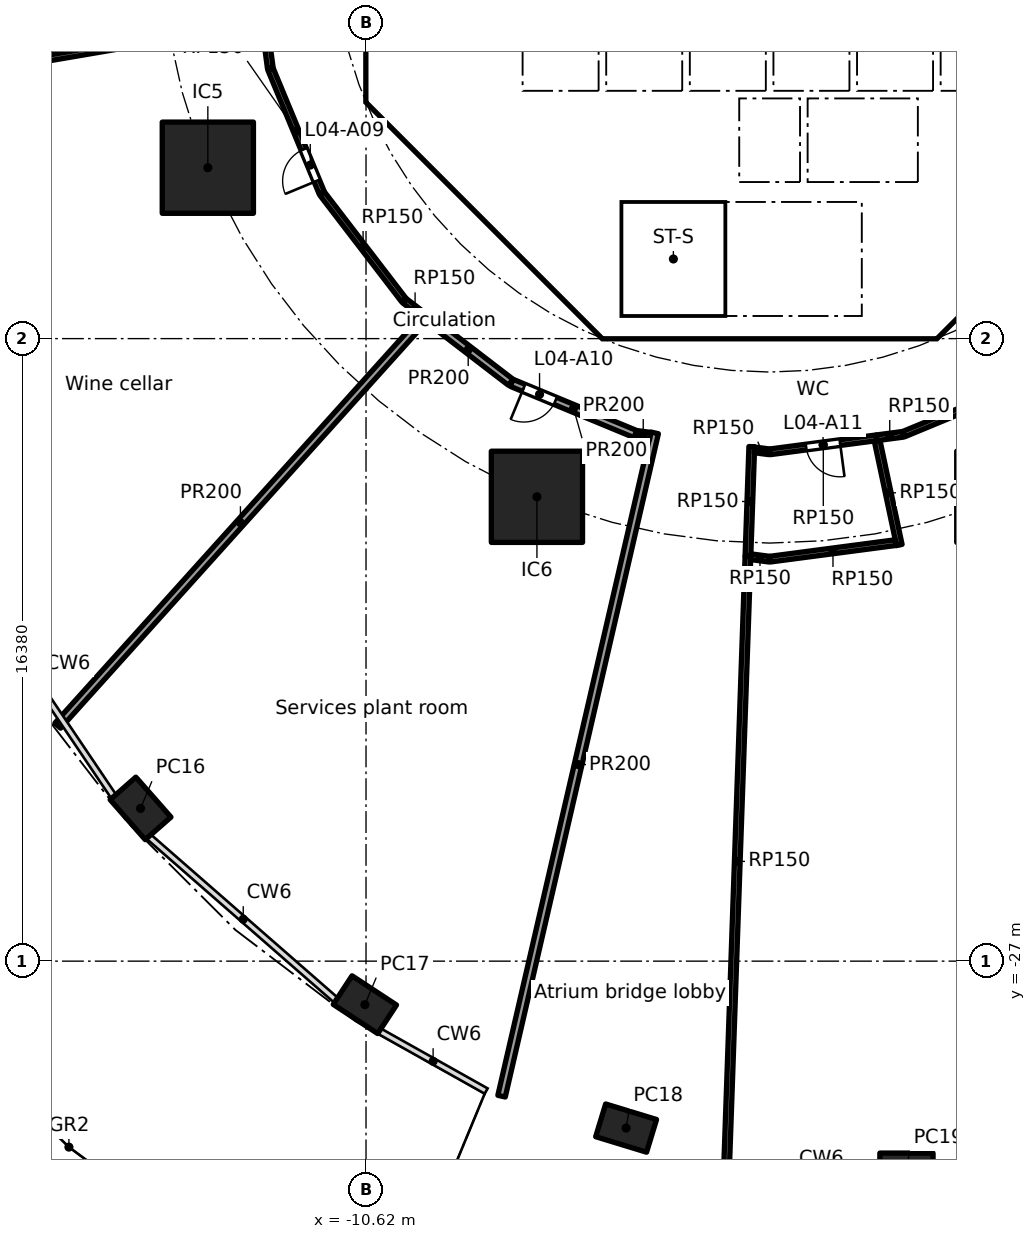
"""IFC4 building model, lengths in metres.
Left out: names, types, materials, properties, quantities, classifications, styles, units other than length and angle.
Written with IfcOpenShell. Run it as: python <this file> out.ifc"""

import sys

from ifc_helpers import new_model, si_unit, direction, frame, frame_2d, origin, origin_2d, place, context, subcontext, project, spatial, polyline, rectangle, hollow_rectangle, outline, extrude, element, fill, save


model = new_model("IFC4")
c1 = context("Model", 3, precision=1e-05, world=origin(), true_north=direction((0.0, 1.0)))
c2 = subcontext(c1, "Body", "Model", "MODEL_VIEW")
j1 = project(units=[si_unit("LENGTHUNIT", "METRE"), si_unit("PLANEANGLEUNIT", "RADIAN")], contexts=[c1])
p1 = place(None, origin())
s1 = spatial("IfcSite", under=j1, at=p1, CompositionType="ELEMENT")
p2 = place(p1, origin())
s2 = spatial("IfcBuilding", under=s1, at=p2, CompositionType="ELEMENT")
p3 = place(p2, frame((0.0, 0.0, 22.0)))
s3 = spatial("IfcBuildingStorey", under=s2, at=p3, CompositionType="ELEMENT", Elevation=22.0)
for number, where, z_axis, x_axis in (
    (1, (-16.552, -22.981, 0.0), (0.0, 0.0, 1.0), (0.66, -0.751, 0.0)),
    (2, (-10.65, -28.146, 0.0), (0.0, 0.0, 1.0), (0.836, -0.549, 0.0)),
    (3, (-3.776, -31.393, 0.0), (0.0, 0.0, 1.0), (0.957, -0.292, 0.0)),
    (4, (3.6, -32.5, 0.0), (0.0, 0.0, 1.0), (1.0, 0.0, 0.0)),
):
    element("IfcColumn", number, at=place(p3, frame(where, z_axis=z_axis, x_axis=x_axis)), inside=s3, PredefinedType="COLUMN", context=c2, shape_type="SweptSolid", body=[
        extrude(hollow_rectangle(XDim=1.4, YDim=0.9, WallThickness=0.05, at=origin_2d()), origin(), (0.0, 0.0, 1.0), 5.0),
    ])
for number, where, z_axis, x_axis in (
    (5, (-14.782, -6.123, 0.0), (0.0, 0.0, 1.0), (1.0, 0.0, 0.0)),
    (6, (-6.123, -14.782, 0.0), (0.0, 0.0, 1.0), (1.0, 0.0, 0.0)),
):
    element("IfcColumn", number, at=place(p3, frame(where, z_axis=z_axis, x_axis=x_axis)), inside=s3, PredefinedType="COLUMN", context=c2, shape_type="SweptSolid", body=[
        extrude(rectangle(XDim=2.4, YDim=2.4, at=origin_2d()), origin(), (0.0, 0.0, 1.0), 5.0),
    ])
p4 = place(p3, frame((-10.325, 3.801, 0.0), z_axis=(0.0, 0.0, 1.0), x_axis=(0.0, -1.0, 0.0)))
e7 = element("IfcWall", 7, at=p4, inside=s3, PredefinedType="SHEAR", context=c2, shape_type="SweptSolid", body=[
    extrude(rectangle(XDim=7.602, YDim=0.6, at=frame_2d((3.801, 0.0))), origin(), (0.0, 0.0, 1.0), 4.74),
])
p5 = place(p4, frame((0.651, 0.0, 0.0)))
e8 = element("IfcOpeningElement", 8, at=p5, cuts=e7, PredefinedType="OPENING", context=c2, shape_type="SweptSolid", body=[
    extrude(rectangle(XDim=1.5, YDim=2.1, at=frame_2d((0.75, 1.05))), frame((0.0, 0.31, 0.0), z_axis=(0.0, -1.0, 0.0), x_axis=(1.0, 0.0, 0.0)), (0.0, 0.0, 1.0), 0.62),
])
p6 = place(p4, frame((5.451, 0.0, 0.0)))
e9 = element("IfcOpeningElement", 9, at=p6, cuts=e7, PredefinedType="OPENING", context=c2, shape_type="SweptSolid", body=[
    extrude(rectangle(XDim=1.5, YDim=2.1, at=frame_2d((0.75, 1.05))), frame((0.0, 0.31, 0.0), z_axis=(0.0, -1.0, 0.0), x_axis=(1.0, 0.0, 0.0)), (0.0, 0.0, 1.0), 0.62),
])
p7 = place(p3, frame((-9.988, -4.613, 0.0), z_axis=(0.0, 0.0, 1.0), x_axis=(0.707106781187, -0.707106781187, 0.0)))
e10 = element("IfcWall", 10, at=p7, inside=s3, PredefinedType="SHEAR", context=c2, shape_type="SweptSolid", body=[
    extrude(rectangle(XDim=7.602, YDim=0.6, at=frame_2d((3.801, 0.0))), origin(), (0.0, 0.0, 1.0), 4.74),
])
p8 = place(p7, frame((6.151, 0.0, 0.0)))
e11 = element("IfcOpeningElement", 11, at=p8, cuts=e10, PredefinedType="OPENING", context=c2, shape_type="SweptSolid", body=[
    extrude(rectangle(XDim=1.1, YDim=2.1, at=frame_2d((0.55, 1.05))), frame((0.0, 0.31, 0.0), z_axis=(0.0, -1.0, 0.0), x_axis=(1.0, 0.0, 0.0)), (0.0, 0.0, 1.0), 0.62),
])
p9 = place(p3, frame((4.613, -9.988, 0.0), z_axis=(0.0, 0.0, 1.0), x_axis=(0.707106781187, 0.707106781187, 0.0)))
e12 = element("IfcWall", 12, at=p9, inside=s3, PredefinedType="SHEAR", context=c2, shape_type="SweptSolid", body=[
    extrude(rectangle(XDim=7.602, YDim=0.6, at=frame_2d((3.801, 0.0))), origin(), (0.0, 0.0, 1.0), 4.74),
])
p10 = place(p9, frame((3.201, 0.0, 0.0)))
e13 = element("IfcOpeningElement", 13, at=p10, cuts=e12, PredefinedType="OPENING", context=c2, shape_type="SweptSolid", body=[
    extrude(rectangle(XDim=1.2, YDim=2.1, at=frame_2d((0.6, 1.05))), frame((0.0, 0.31, 0.0), z_axis=(0.0, -1.0, 0.0), x_axis=(1.0, 0.0, 0.0)), (0.0, 0.0, 1.0), 0.62),
])
p11 = place(p3, frame((4.0, -10.025, 0.0), z_axis=(0.0, 0.0, 1.0), x_axis=(0.0, 1.0, 0.0)))
e14 = element("IfcWall", 14, at=p11, inside=s3, PredefinedType="SOLIDWALL", context=c2, shape_type="SweptSolid", body=[
    extrude(rectangle(XDim=3.0, YDim=0.2, at=frame_2d((1.5, 0.0))), origin(), (0.0, 0.0, 1.0), 4.74),
])
p12 = place(p11, frame((0.975, 0.0, 0.0)))
e15 = element("IfcOpeningElement", 15, at=p12, cuts=e14, PredefinedType="OPENING", context=c2, shape_type="SweptSolid", body=[
    extrude(rectangle(XDim=1.1, YDim=2.1, at=frame_2d((0.55, 1.05))), frame((0.0, 0.11, 0.0), z_axis=(0.0, -1.0, 0.0), x_axis=(1.0, 0.0, 0.0)), (0.0, 0.0, 1.0), 0.22),
])
p13 = place(p3, frame((-5.8, -8.227, 0.0), z_axis=(0.0, 0.0, 1.0), x_axis=(0.0, 1.0, 0.0)))
e16 = element("IfcWall", 16, at=p13, inside=s3, PredefinedType="PARTITIONING", context=c2, shape_type="SweptSolid", body=[
    extrude(rectangle(XDim=3.927, YDim=0.15, at=frame_2d((1.963, 0.0))), origin(), (0.0, 0.0, 1.0), 4.74),
])
p14 = place(p13, frame((2.615, 0.0, 0.0)))
e17 = element("IfcOpeningElement", 17, at=p14, cuts=e16, PredefinedType="OPENING", context=c2, shape_type="SweptSolid", body=[
    extrude(rectangle(XDim=0.9, YDim=2.1, at=frame_2d((0.45, 1.05))), frame((0.0, 0.085, 0.0), z_axis=(0.0, -1.0, 0.0), x_axis=(1.0, 0.0, 0.0)), (0.0, 0.0, 1.0), 0.17),
])
p15 = place(p13, frame((0.539, 0.0, 0.0)))
e18 = element("IfcOpeningElement", 18, at=p15, cuts=e16, PredefinedType="OPENING", context=c2, shape_type="SweptSolid", body=[
    extrude(rectangle(XDim=0.9, YDim=2.1, at=frame_2d((0.45, 1.05))), frame((0.0, 0.085, 0.0), z_axis=(0.0, -1.0, 0.0), x_axis=(1.0, 0.0, 0.0)), (0.0, 0.0, 1.0), 0.17),
])
p16 = place(p3, frame((4.0, -6.5, 0.0), z_axis=(0.0, 0.0, 1.0), x_axis=(0.0, 1.0, 0.0)))
e19 = element("IfcWall", 19, at=p16, inside=s3, PredefinedType="SOLIDWALL", context=c2, shape_type="SweptSolid", body=[
    extrude(rectangle(XDim=2.2, YDim=0.2, at=frame_2d((1.1, 0.0))), origin(), (0.0, 0.0, 1.0), 4.74),
])
p17 = place(p16, frame((0.55, 0.0, 0.0)))
e20 = element("IfcOpeningElement", 20, at=p17, cuts=e19, PredefinedType="OPENING", context=c2, shape_type="SweptSolid", body=[
    extrude(rectangle(XDim=1.1, YDim=2.1, at=frame_2d((0.55, 1.05))), frame((0.0, 0.11, 0.0), z_axis=(0.0, -1.0, 0.0), x_axis=(1.0, 0.0, 0.0)), (0.0, 0.0, 1.0), 0.22),
])
p18 = place(p3, frame((-4.0, -6.5, 0.0), z_axis=(0.0, 0.0, 1.0), x_axis=(0.0, 1.0, 0.0)))
e21 = element("IfcWall", 21, at=p18, inside=s3, PredefinedType="SOLIDWALL", context=c2, shape_type="SweptSolid", body=[
    extrude(rectangle(XDim=2.2, YDim=0.2, at=frame_2d((1.1, 0.0))), origin(), (0.0, 0.0, 1.0), 4.74),
])
p19 = place(p18, frame((0.65, 0.0, 0.0)))
e22 = element("IfcOpeningElement", 22, at=p19, cuts=e21, PredefinedType="OPENING", context=c2, shape_type="SweptSolid", body=[
    extrude(rectangle(XDim=0.9, YDim=2.1, at=frame_2d((0.45, 1.05))), frame((0.0, 0.11, 0.0), z_axis=(0.0, -1.0, 0.0), x_axis=(1.0, 0.0, 0.0)), (0.0, 0.0, 1.0), 0.22),
])
p20 = place(p3, origin())
e23 = element("IfcWall", 23, at=p20, inside=s3, PredefinedType="SHEAR", context=c2, shape_type="SweptSolid", body=[
    extrude(outline(polyline([(-10.625, -3.801), (-10.025, -3.801), (-10.025, -4.152), (-9.776, -4.401), (-10.2, -4.825), (-10.625, -4.401), (-10.625, -3.801)])), origin(), (0.0, 0.0, 1.0), 4.74),
])
p21 = place(p3, origin())
e24 = element("IfcWall", 24, at=p21, inside=s3, PredefinedType="SHEAR", context=c2, shape_type="SweptSolid", body=[
    extrude(outline(polyline([(-4.152, -10.025), (4.152, -10.025), (4.401, -9.776), (4.825, -10.2), (4.401, -10.625), (-4.401, -10.625), (-4.825, -10.2), (-4.401, -9.776), (-4.152, -10.025)])), origin(), (0.0, 0.0, 1.0), 4.74),
])
p22 = place(p3, frame((-10.025, -4.0, 0.0), z_axis=(0.0, 0.0, 1.0), x_axis=(1.0, 0.0, 0.0)))
e25 = element("IfcWall", 25, at=p22, inside=s3, PredefinedType="PARTITIONING", context=c2, shape_type="SweptSolid", body=[
    extrude(rectangle(XDim=3.325, YDim=0.2, at=frame_2d((1.662, 0.0))), origin(), (0.0, 0.0, 1.0), 4.74),
])
p23 = place(p3, frame((-8.001, -6.1, 0.0), z_axis=(0.0, 0.0, 1.0), x_axis=(1.0, 0.0, 0.0)))
e26 = element("IfcWall", 26, at=p23, inside=s3, PredefinedType="PARTITIONING", context=c2, shape_type="SweptSolid", body=[
    extrude(rectangle(XDim=2.126, YDim=0.15, at=frame_2d((1.063, 0.0))), origin(), (0.0, 0.0, 1.0), 4.74),
])
for number, where, z_axis, x_axis in (
    (27, (-0.9, -6.5, 0.0), (0.0, 0.0, 1.0), (0.0, 1.0, 0.0)),
    (28, (0.9, -6.5, 0.0), (0.0, 0.0, 1.0), (0.0, 1.0, 0.0)),
):
    element("IfcWall", number, at=place(p3, frame(where, z_axis=z_axis, x_axis=x_axis)), inside=s3, PredefinedType="SOLIDWALL", context=c2, shape_type="SweptSolid", body=[
        extrude(rectangle(XDim=2.2, YDim=0.2, at=frame_2d((1.1, 0.0))), origin(), (0.0, 0.0, 1.0), 4.74),
    ])
p24 = place(p3, origin())
e29 = element("IfcWall", 29, at=p24, inside=s3, PredefinedType="SOLIDWALL", context=c2, shape_type="SweptSolid", body=[
    extrude(outline(polyline([(-6.7, -2.1), (-6.5, -2.1), (-6.5, -4.1), (-4.5, -4.1), (-4.5, -2.1), (-4.3, -2.1), (-4.3, -4.1), (-2.3, -4.1), (-2.3, -2.1), (-2.1, -2.1), (-2.1, -4.1), (-0.1, -4.1), (-0.1, -2.1), (0.1, -2.1), (0.1, -4.1), (2.1, -4.1), (2.1, -2.1), (2.3, -2.1), (2.3, -4.1), (4.3, -4.1), (4.3, -2.1), (4.5, -2.1), (4.5, -4.1), (6.5, -4.1), (6.5, -2.1), (6.7, -2.1), (6.7, -4.3), (-6.7, -4.3), (-6.7, -2.1)])), origin(), (0.0, 0.0, 1.0), 4.74),
])
p25 = place(p3, origin())
e30 = element("IfcWall", 30, at=p25, inside=s3, PredefinedType="SOLIDWALL", context=c2, shape_type="SweptSolid", body=[
    extrude(outline(polyline([(-3.9, -10.025), (-4.1, -10.025), (-4.1, -7.025), (-3.9, -7.025), (-3.9, -10.025)])), origin(), (0.0, 0.0, 1.0), 4.74),
])
p26 = place(p3, origin())
e31 = element("IfcWall", 31, at=p26, inside=s3, PredefinedType="SOLIDWALL", context=c2, shape_type="SweptSolid", body=[
    extrude(outline(polyline([(4.1, -7.025), (-4.1, -7.025), (-4.1, -6.5), (4.1, -6.5), (4.1, -7.025)])), origin(), (0.0, 0.0, 1.0), 4.74),
])
p27 = place(p3, frame((-13.375, -2.282, 0.0), z_axis=(0.0, 0.0, 1.0), x_axis=(-0.985753347153, -0.168197320361, 0.0)))
e32 = element("IfcWall", 32, at=p27, inside=s3, PredefinedType="PARTITIONING", context=c2, shape_type="SweptSolid", body=[
    extrude(rectangle(XDim=11.847, YDim=0.15, at=frame_2d((5.924, 0.0))), origin(), (0.0, 0.0, 1.0), 4.74),
])
p28 = place(p3, frame((-13.138, -3.508, 0.0), z_axis=(0.0, 0.0, 1.0), x_axis=(-0.130575867104, 0.991438320285, 0.0)))
e33 = element("IfcWall", 33, at=p28, inside=s3, PredefinedType="PARTITIONING", context=c2, shape_type="SweptSolid", body=[
    extrude(rectangle(XDim=1.249, YDim=0.15, at=frame_2d((0.625, 0.0))), origin(), (0.0, 0.0, 1.0), 4.74),
])
p29 = place(p3, frame((-11.782, -6.789, 0.0), z_axis=(0.0, 0.0, 1.0), x_axis=(-0.382677866108, 0.923881838111, 0.0)))
e34 = element("IfcWall", 34, at=p29, inside=s3, PredefinedType="PARTITIONING", context=c2, shape_type="SweptSolid", body=[
    extrude(rectangle(XDim=3.527, YDim=0.15, at=frame_2d((1.763, 0.0))), origin(), (0.0, 0.0, 1.0), 4.74),
])
p30 = place(p29, frame((0.346, 0.0, 0.0)))
e35 = element("IfcOpeningElement", 35, at=p30, cuts=e34, PredefinedType="OPENING", context=c2, shape_type="SweptSolid", body=[
    extrude(rectangle(XDim=0.9, YDim=2.1, at=frame_2d((0.45, 1.05))), frame((0.0, 0.085, 0.0), z_axis=(0.0, -1.0, 0.0), x_axis=(1.0, 0.0, 0.0)), (0.0, 0.0, 1.0), 0.17),
])
p31 = place(p3, frame((-9.624, -9.607, 0.0), z_axis=(0.0, 0.0, 1.0), x_axis=(-0.608736710054, 0.793372307201, 0.0)))
e36 = element("IfcWall", 36, at=p31, inside=s3, PredefinedType="PARTITIONING", context=c2, shape_type="SweptSolid", body=[
    extrude(rectangle(XDim=3.527, YDim=0.15, at=frame_2d((1.763, 0.0))), origin(), (0.0, 0.0, 1.0), 4.74),
])
p32 = place(p3, frame((-9.05, -10.051, 0.0), z_axis=(0.0, 0.0, 1.0), x_axis=(-0.793399175387, 0.608701690893, 0.0)))
e37 = element("IfcWall", 37, at=p32, inside=s3, PredefinedType="PARTITIONING", context=c2, shape_type="SweptSolid", body=[
    extrude(rectangle(XDim=0.702, YDim=0.15, at=frame_2d((0.351, 0.0))), origin(), (0.0, 0.0, 1.0), 4.74),
])
p33 = place(p3, frame((-0.571, -16.349, 0.0), z_axis=(0.0, 0.0, 1.0), x_axis=(-0.034915122528, -0.999390281231, 0.0)))
e38 = element("IfcWall", 38, at=p33, inside=s3, PredefinedType="PARTITIONING", context=c2, shape_type="SweptSolid", body=[
    extrude(rectangle(XDim=16.062, YDim=0.15, at=frame_2d((8.031, 0.0))), origin(), (0.0, 0.0, 1.0), 4.74),
])
p34 = place(p3, frame((-0.47, -13.462, 0.0), z_axis=(0.0, 0.0, 1.0), x_axis=(-0.034907670303, -0.999390541557, 0.0)))
e39 = element("IfcWall", 39, at=p34, inside=s3, PredefinedType="PARTITIONING", context=c2, shape_type="SweptSolid", body=[
    extrude(rectangle(XDim=2.888, YDim=0.15, at=frame_2d((1.444, 0.0))), origin(), (0.0, 0.0, 1.0), 4.74),
])
p35 = place(p3, frame((-0.012, -16.423, 0.0), z_axis=(0.0, 0.0, 1.0), x_axis=(-0.991457697021, 0.130428658731, 0.0)))
e40 = element("IfcWall", 40, at=p35, inside=s3, PredefinedType="PARTITIONING", context=c2, shape_type="SweptSolid", body=[
    extrude(rectangle(XDim=0.489, YDim=0.15, at=frame_2d((0.244, 0.0))), origin(), (0.0, 0.0, 1.0), 4.74),
])
p36 = place(p3, frame((-0.012, -13.598, 0.0), z_axis=(0.0, 0.0, 1.0), x_axis=(-0.991467089631, 0.130357240609, 0.0)))
e41 = element("IfcWall", 41, at=p36, inside=s3, PredefinedType="PARTITIONING", context=c2, shape_type="SweptSolid", body=[
    extrude(rectangle(XDim=0.39, YDim=0.15, at=frame_2d((0.195, 0.0))), origin(), (0.0, 0.0, 1.0), 4.74),
])
p37 = place(p3, frame((2.812, -13.23, 0.0), z_axis=(0.0, 0.0, 1.0), x_axis=(-0.991445467051, -0.130521591565, 0.0)))
e42 = element("IfcWall", 42, at=p37, inside=s3, PredefinedType="PARTITIONING", context=c2, shape_type="SweptSolid", body=[
    extrude(rectangle(XDim=2.824, YDim=0.15, at=frame_2d((1.412, 0.0))), origin(), (0.0, 0.0, 1.0), 4.74),
])
p38 = place(p37, frame((0.968, 0.0, 0.0)))
e43 = element("IfcOpeningElement", 43, at=p38, cuts=e42, PredefinedType="OPENING", context=c2, shape_type="SweptSolid", body=[
    extrude(rectangle(XDim=0.9, YDim=2.1, at=frame_2d((0.45, 1.05))), frame((0.0, 0.085, 0.0), z_axis=(0.0, -1.0, 0.0), x_axis=(1.0, 0.0, 0.0)), (0.0, 0.0, 1.0), 0.17),
])
p39 = place(p3, frame((2.828, -13.303, 0.0), z_axis=(0.0, 0.0, 1.0), x_axis=(0.207920091501, -0.978145815076, 0.0)))
e44 = element("IfcWall", 44, at=p39, inside=s3, PredefinedType="PARTITIONING", context=c2, shape_type="SweptSolid", body=[
    extrude(rectangle(XDim=2.809, YDim=0.15, at=frame_2d((1.404, 0.0))), origin(), (0.0, 0.0, 1.0), 4.74),
])
p40 = place(p3, frame((3.321, -15.987, 0.0), z_axis=(0.0, 0.0, 1.0), x_axis=(-0.991441844339, -0.130549106827, 0.0)))
e45 = element("IfcWall", 45, at=p40, inside=s3, PredefinedType="PARTITIONING", context=c2, shape_type="SweptSolid", body=[
    extrude(rectangle(XDim=3.338, YDim=0.15, at=frame_2d((1.669, 0.0))), origin(), (0.0, 0.0, 1.0), 4.74),
])
p41 = place(p3, frame((3.508, -13.138, 0.0), z_axis=(0.0, 0.0, 1.0), x_axis=(-0.991460212813, -0.130409533429, 0.0)))
e46 = element("IfcWall", 46, at=p41, inside=s3, PredefinedType="PARTITIONING", context=c2, shape_type="SweptSolid", body=[
    extrude(rectangle(XDim=0.702, YDim=0.15, at=frame_2d((0.351, 0.0))), origin(), (0.0, 0.0, 1.0), 4.74),
])
p42 = place(p3, frame((6.789, -11.782, 0.0), z_axis=(0.0, 0.0, 1.0), x_axis=(-0.923881838111, -0.382677866108, 0.0)))
e47 = element("IfcWall", 47, at=p42, inside=s3, PredefinedType="PARTITIONING", context=c2, shape_type="SweptSolid", body=[
    extrude(rectangle(XDim=3.527, YDim=0.15, at=frame_2d((1.763, 0.0))), origin(), (0.0, 0.0, 1.0), 4.74),
])
p43 = place(p3, frame((-9.117, -10.126, 0.0), z_axis=(0.0, 0.0, 1.0), x_axis=(-0.669127133422, -0.743147952509, 0.0)))
e48 = element("IfcWall", 48, at=p43, inside=s3, PredefinedType="PARTITIONING", context=c2, shape_type="SweptSolid", body=[
    extrude(rectangle(XDim=14.367, YDim=0.2, at=frame_2d((7.184, 0.0))), origin(), (0.0, 0.0, 1.0), 4.74),
])
p44 = place(p3, frame((-7.053, -30.552, 0.0), z_axis=(0.0, 0.0, 1.0), x_axis=(0.224939147882, 0.974372813532, 0.0)))
e49 = element("IfcWall", 49, at=p44, inside=s3, PredefinedType="PARTITIONING", context=c2, shape_type="SweptSolid", body=[
    extrude(rectangle(XDim=17.911, YDim=0.2, at=frame_2d((8.955, 0.0))), origin(), (0.0, 0.0, 1.0), 4.74),
])
p45 = place(p3, frame((-6.812, -11.769, 0.0), z_axis=(0.0, 0.0, 1.0), x_axis=(-0.793389024662, 0.608714921409, 0.0)))
e50 = element("IfcWall", 50, at=p45, inside=s3, PredefinedType="PARTITIONING", context=c2, shape_type="SweptSolid", body=[
    extrude(rectangle(XDim=2.821, YDim=0.2, at=frame_2d((1.411, 0.0))), origin(), (0.0, 0.0, 1.0), 4.74),
])
p46 = place(p3, frame((-3.534, -13.131, 0.0), z_axis=(0.0, 0.0, 1.0), x_axis=(-0.92386297064, 0.382723413813, 0.0)))
e51 = element("IfcWall", 51, at=p46, inside=s3, PredefinedType="PARTITIONING", context=c2, shape_type="SweptSolid", body=[
    extrude(rectangle(XDim=3.52, YDim=0.2, at=frame_2d((1.76, 0.0))), origin(), (0.0, 0.0, 1.0), 4.74),
])
p47 = place(p46, frame((2.278, 0.0, 0.0)))
e52 = element("IfcOpeningElement", 52, at=p47, cuts=e51, PredefinedType="OPENING", context=c2, shape_type="SweptSolid", body=[
    extrude(rectangle(XDim=0.9, YDim=2.1, at=frame_2d((0.45, 1.05))), frame((0.0, 0.11, 0.0), z_axis=(0.0, -1.0, 0.0), x_axis=(1.0, 0.0, 0.0)), (0.0, 0.0, 1.0), 0.22),
])
p48 = place(p3, frame((-3.147, -13.186, 0.0), z_axis=(0.0, 0.0, 1.0), x_axis=(-0.991456595727, 0.130437029976, 0.0)))
e53 = element("IfcWall", 53, at=p48, inside=s3, PredefinedType="PARTITIONING", context=c2, shape_type="SweptSolid", body=[
    extrude(rectangle(XDim=0.361, YDim=0.2, at=frame_2d((0.181, 0.0))), origin(), (0.0, 0.0, 1.0), 4.74),
])
p49 = place(p17, origin())
e54 = element("IfcDoor", 54, at=p49, inside=s3, OperationType="DOUBLE_DOOR_SLIDING", PredefinedType="DOOR", context=c2, shape_type="SweptSolid", body=[
    extrude(rectangle(XDim=1.1, YDim=2.1, at=frame_2d((0.55, 1.05))), frame((0.0, 0.025, 0.0), z_axis=(0.0, -1.0, 0.0), x_axis=(1.0, 0.0, 0.0)), (0.0, 0.0, 1.0), 0.05),
])
fill(e20, e54)
p50 = place(p12, origin())
e55 = element("IfcDoor", 55, at=p50, inside=s3, OperationType="SINGLE_SWING_RIGHT", PredefinedType="DOOR", context=c2, shape_type="SweptSolid", body=[
    extrude(rectangle(XDim=1.1, YDim=2.1, at=frame_2d((0.55, 1.05))), frame((0.0, 0.025, 0.0), z_axis=(0.0, -1.0, 0.0), x_axis=(1.0, 0.0, 0.0)), (0.0, 0.0, 1.0), 0.05),
])
fill(e15, e55)
p51 = place(p14, origin())
e56 = element("IfcDoor", 56, at=p51, inside=s3, OperationType="SINGLE_SWING_RIGHT", PredefinedType="DOOR", context=c2, shape_type="SweptSolid", body=[
    extrude(rectangle(XDim=0.9, YDim=2.1, at=frame_2d((0.45, 1.05))), frame((0.0, 0.025, 0.0), z_axis=(0.0, -1.0, 0.0), x_axis=(1.0, 0.0, 0.0)), (0.0, 0.0, 1.0), 0.05),
])
fill(e17, e56)
p52 = place(p15, origin())
e57 = element("IfcDoor", 57, at=p52, inside=s3, OperationType="SINGLE_SWING_RIGHT", PredefinedType="DOOR", context=c2, shape_type="SweptSolid", body=[
    extrude(rectangle(XDim=0.9, YDim=2.1, at=frame_2d((0.45, 1.05))), frame((0.0, 0.025, 0.0), z_axis=(0.0, -1.0, 0.0), x_axis=(1.0, 0.0, 0.0)), (0.0, 0.0, 1.0), 0.05),
])
fill(e18, e57)
p53 = place(p19, frame((0.9, 0.0, 0.0), x_axis=(-1.0, 0.0, 0.0)))
e58 = element("IfcDoor", 58, at=p53, inside=s3, OperationType="SINGLE_SWING_LEFT", PredefinedType="DOOR", context=c2, shape_type="SweptSolid", body=[
    extrude(rectangle(XDim=0.9, YDim=2.1, at=frame_2d((0.45, 1.05))), frame((0.0, 0.025, 0.0), z_axis=(0.0, -1.0, 0.0), x_axis=(1.0, 0.0, 0.0)), (0.0, 0.0, 1.0), 0.05),
])
fill(e22, e58)
p54 = place(p6, origin())
e59 = element("IfcDoor", 59, at=p54, inside=s3, OperationType="DOUBLE_DOOR_SINGLE_SWING", PredefinedType="DOOR", context=c2, shape_type="SweptSolid", body=[
    extrude(rectangle(XDim=1.5, YDim=2.1, at=frame_2d((0.75, 1.05))), frame((0.0, 0.025, 0.0), z_axis=(0.0, -1.0, 0.0), x_axis=(1.0, 0.0, 0.0)), (0.0, 0.0, 1.0), 0.05),
])
fill(e9, e59)
p55 = place(p8, origin())
e60 = element("IfcDoor", 60, at=p55, inside=s3, OperationType="SINGLE_SWING_LEFT", PredefinedType="DOOR", context=c2, shape_type="SweptSolid", body=[
    extrude(rectangle(XDim=1.1, YDim=2.1, at=frame_2d((0.55, 1.05))), frame((0.0, 0.025, 0.0), z_axis=(0.0, -1.0, 0.0), x_axis=(1.0, 0.0, 0.0)), (0.0, 0.0, 1.0), 0.05),
])
fill(e11, e60)
p56 = place(p30, origin())
e61 = element("IfcDoor", 61, at=p56, inside=s3, OperationType="SINGLE_SWING_LEFT", PredefinedType="DOOR", context=c2, shape_type="SweptSolid", body=[
    extrude(rectangle(XDim=0.9, YDim=2.1, at=frame_2d((0.45, 1.05))), frame((0.0, 0.025, 0.0), z_axis=(0.0, -1.0, 0.0), x_axis=(1.0, 0.0, 0.0)), (0.0, 0.0, 1.0), 0.05),
])
fill(e35, e61)
p57 = place(p47, origin())
e62 = element("IfcDoor", 62, at=p57, inside=s3, OperationType="SINGLE_SWING_RIGHT", PredefinedType="DOOR", context=c2, shape_type="SweptSolid", body=[
    extrude(rectangle(XDim=0.9, YDim=2.1, at=frame_2d((0.45, 1.05))), frame((0.0, 0.025, 0.0), z_axis=(0.0, -1.0, 0.0), x_axis=(1.0, 0.0, 0.0)), (0.0, 0.0, 1.0), 0.05),
])
fill(e52, e62)
p58 = place(p38, origin())
e63 = element("IfcDoor", 63, at=p58, inside=s3, OperationType="SINGLE_SWING_LEFT", PredefinedType="DOOR", context=c2, shape_type="SweptSolid", body=[
    extrude(rectangle(XDim=0.9, YDim=2.1, at=frame_2d((0.45, 1.05))), frame((0.0, 0.025, 0.0), z_axis=(0.0, -1.0, 0.0), x_axis=(1.0, 0.0, 0.0)), (0.0, 0.0, 1.0), 0.05),
])
fill(e43, e63)
save(model, sys.argv[1])
